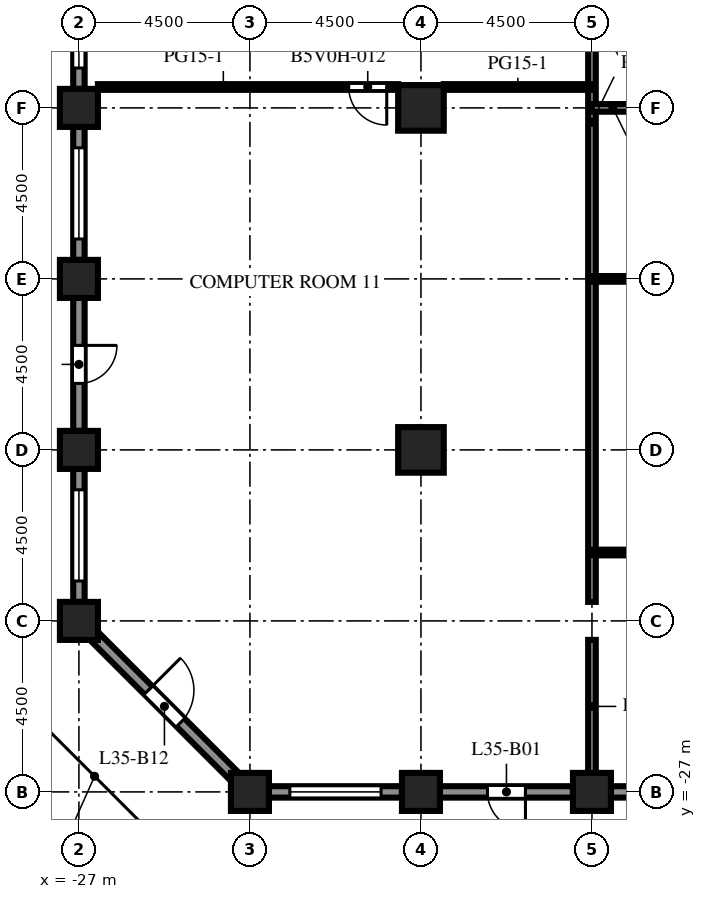
"""IFC4 building model, lengths in metres.
Left out: names, types, materials, properties, quantities, classifications, styles, units other than length and angle.
Written with IfcOpenShell. Run it as: python <this file> out.ifc"""

import sys

from ifc_helpers import new_model, si_unit, direction, frame, frame_2d, origin, origin_2d, place, context, subcontext, project, spatial, rectangle, extrude, element, fill, save


model = new_model("IFC4")
c1 = context("Model", 3, precision=1e-05, world=origin(), true_north=direction((0.0, 1.0)))
c2 = subcontext(c1, "Body", "Model", "MODEL_VIEW")
j1 = project(units=[si_unit("LENGTHUNIT", "METRE"), si_unit("PLANEANGLEUNIT", "RADIAN")], contexts=[c1])
p1 = place(None, origin())
s1 = spatial("IfcSite", under=j1, at=p1, CompositionType="ELEMENT")
p2 = place(p1, origin())
s2 = spatial("IfcBuilding", under=s1, at=p2, CompositionType="ELEMENT")
p3 = place(p2, frame((0.0, 0.0, 156.8)))
s3 = spatial("IfcBuildingStorey", under=s2, at=p3, CompositionType="ELEMENT", Elevation=156.8)
for number, where, z_axis, x_axis in (
    (1, (-27.0, -22.5, 0.0), (0.0, 0.0, 1.0), (1.0, 0.0, 0.0)),
    (2, (-27.0, -18.0, 0.0), (0.0, 0.0, 1.0), (1.0, 0.0, 0.0)),
    (3, (-27.0, -13.5, 0.0), (0.0, 0.0, 1.0), (1.0, 0.0, 0.0)),
    (4, (-27.0, -9.0, 0.0), (0.0, 0.0, 1.0), (1.0, 0.0, 0.0)),
):
    element("IfcColumn", number, at=place(p3, frame(where, z_axis=z_axis, x_axis=x_axis)), inside=s3, PredefinedType="COLUMN", context=c2, shape_type="SweptSolid", body=[
        extrude(rectangle(XDim=1.0, YDim=1.0, at=origin_2d()), origin(), (0.0, 0.0, 1.0), 4.1),
    ])
for number, where, z_axis, x_axis in (
    (5, (-22.5, -27.0, -0.45), (0.0, 0.0, 1.0), (1.0, 0.0, 0.0)),
    (6, (-18.0, -27.0, -0.45), (0.0, 0.0, 1.0), (1.0, 0.0, 0.0)),
    (7, (-13.5, -27.0, -0.45), (0.0, 0.0, 1.0), (1.0, 0.0, 0.0)),
):
    element("IfcColumn", number, at=place(p3, frame(where, z_axis=z_axis, x_axis=x_axis)), inside=s3, PredefinedType="COLUMN", context=c2, shape_type="SweptSolid", body=[
        extrude(rectangle(XDim=1.0, YDim=1.0, at=origin_2d()), origin(), (0.0, 0.0, 1.0), 4.55),
    ])
for number, where, z_axis, x_axis in (
    (8, (-18.0, -18.0, -0.45), (0.0, 0.0, 1.0), (1.0, 0.0, 0.0)),
    (9, (-18.0, -9.0, -0.45), (0.0, 0.0, 1.0), (1.0, 0.0, 0.0)),
):
    element("IfcColumn", number, at=place(p3, frame(where, z_axis=z_axis, x_axis=x_axis)), inside=s3, PredefinedType="COLUMN", context=c2, shape_type="SweptSolid", body=[
        extrude(rectangle(XDim=1.2, YDim=1.2, at=origin_2d()), origin(), (0.0, 0.0, 1.0), 4.55),
    ])
p4 = place(p3, frame((-18.5, -27.0, 0.0), z_axis=(0.0, 0.0, 1.0), x_axis=(-1.0, 0.0, 0.0)))
e10 = element("IfcWall", 10, at=p4, inside=s3, PredefinedType="SOLIDWALL", context=c2, shape_type="SweptSolid", body=[
    extrude(rectangle(XDim=3.5, YDim=0.3, at=frame_2d((1.75, 0.0))), origin(), (0.0, 0.0, 1.0), 2.85),
])
p5 = place(p4, frame((0.55, 0.0, 0.8)))
e11 = element("IfcOpeningElement", 11, at=p5, cuts=e10, PredefinedType="OPENING", context=c2, shape_type="SweptSolid", body=[
    extrude(rectangle(XDim=2.4, YDim=1.7, at=frame_2d((1.2, 0.85))), frame((0.0, 0.16, 0.0), z_axis=(0.0, -1.0, 0.0), x_axis=(1.0, 0.0, 0.0)), (0.0, 0.0, 1.0), 0.32),
])
p6 = place(p3, frame((-14.0, -27.0, 0.0), z_axis=(0.0, 0.0, 1.0), x_axis=(-1.0, 0.0, 0.0)))
e12 = element("IfcWall", 12, at=p6, inside=s3, PredefinedType="SOLIDWALL", context=c2, shape_type="SweptSolid", body=[
    extrude(rectangle(XDim=3.5, YDim=0.3, at=frame_2d((1.75, 0.0))), origin(), (0.0, 0.0, 1.0), 2.85),
])
p7 = place(p6, frame((1.25, 0.0, 0.0)))
e13 = element("IfcOpeningElement", 13, at=p7, cuts=e12, PredefinedType="OPENING", context=c2, shape_type="SweptSolid", body=[
    extrude(rectangle(XDim=1.0, YDim=2.2, at=frame_2d((0.5, 1.1))), frame((0.0, 0.16, 0.0), z_axis=(0.0, -1.0, 0.0), x_axis=(1.0, 0.0, 0.0)), (0.0, 0.0, 1.0), 0.32),
])
p8 = place(p3, frame((-9.5, -27.0, 0.0), z_axis=(0.0, 0.0, 1.0), x_axis=(-1.0, 0.0, 0.0)))
e14 = element("IfcWall", 14, at=p8, inside=s3, PredefinedType="SOLIDWALL", context=c2, shape_type="SweptSolid", body=[
    extrude(rectangle(XDim=3.5, YDim=0.3, at=frame_2d((1.75, 0.0))), origin(), (0.0, 0.0, 1.0), 2.85),
])
p9 = place(p8, frame((0.55, 0.0, 0.8)))
e15 = element("IfcOpeningElement", 15, at=p9, cuts=e14, PredefinedType="OPENING", context=c2, shape_type="SweptSolid", body=[
    extrude(rectangle(XDim=2.4, YDim=1.7, at=frame_2d((1.2, 0.85))), frame((0.0, 0.16, 0.0), z_axis=(0.0, -1.0, 0.0), x_axis=(1.0, 0.0, 0.0)), (0.0, 0.0, 1.0), 0.32),
])
p10 = place(p3, frame((-27.0, -8.5, 0.0), z_axis=(0.0, 0.0, 1.0), x_axis=(0.0, 1.0, 0.0)))
e16 = element("IfcWall", 16, at=p10, inside=s3, PredefinedType="SOLIDWALL", context=c2, shape_type="SweptSolid", body=[
    extrude(rectangle(XDim=3.5, YDim=0.3, at=frame_2d((1.75, 0.0))), origin(), (0.0, 0.0, 1.0), 2.85),
])
p11 = place(p10, frame((0.55, 0.0, 0.8)))
e17 = element("IfcOpeningElement", 17, at=p11, cuts=e16, PredefinedType="OPENING", context=c2, shape_type="SweptSolid", body=[
    extrude(rectangle(XDim=2.4, YDim=1.7, at=frame_2d((1.2, 0.85))), frame((0.0, 0.16, 0.0), z_axis=(0.0, -1.0, 0.0), x_axis=(1.0, 0.0, 0.0)), (0.0, 0.0, 1.0), 0.32),
])
p12 = place(p3, frame((-27.0, -13.0, 0.0), z_axis=(0.0, 0.0, 1.0), x_axis=(0.0, 1.0, 0.0)))
e18 = element("IfcWall", 18, at=p12, inside=s3, PredefinedType="SOLIDWALL", context=c2, shape_type="SweptSolid", body=[
    extrude(rectangle(XDim=3.5, YDim=0.3, at=frame_2d((1.75, 0.0))), origin(), (0.0, 0.0, 1.0), 2.85),
])
p13 = place(p12, frame((0.55, 0.0, 0.8)))
e19 = element("IfcOpeningElement", 19, at=p13, cuts=e18, PredefinedType="OPENING", context=c2, shape_type="SweptSolid", body=[
    extrude(rectangle(XDim=2.4, YDim=1.7, at=frame_2d((1.2, 0.85))), frame((0.0, 0.16, 0.0), z_axis=(0.0, -1.0, 0.0), x_axis=(1.0, 0.0, 0.0)), (0.0, 0.0, 1.0), 0.32),
])
p14 = place(p3, frame((-27.0, -17.5, 0.0), z_axis=(0.0, 0.0, 1.0), x_axis=(0.0, 1.0, 0.0)))
e20 = element("IfcWall", 20, at=p14, inside=s3, PredefinedType="SOLIDWALL", context=c2, shape_type="SweptSolid", body=[
    extrude(rectangle(XDim=3.5, YDim=0.3, at=frame_2d((1.75, 0.0))), origin(), (0.0, 0.0, 1.0), 2.85),
])
p15 = place(p14, frame((1.25, 0.0, 0.0)))
e21 = element("IfcOpeningElement", 21, at=p15, cuts=e20, PredefinedType="OPENING", context=c2, shape_type="SweptSolid", body=[
    extrude(rectangle(XDim=1.0, YDim=2.2, at=frame_2d((0.5, 1.1))), frame((0.0, 0.16, 0.0), z_axis=(0.0, -1.0, 0.0), x_axis=(1.0, 0.0, 0.0)), (0.0, 0.0, 1.0), 0.32),
])
p16 = place(p3, frame((-27.0, -22.0, 0.0), z_axis=(0.0, 0.0, 1.0), x_axis=(0.0, 1.0, 0.0)))
e22 = element("IfcWall", 22, at=p16, inside=s3, PredefinedType="SOLIDWALL", context=c2, shape_type="SweptSolid", body=[
    extrude(rectangle(XDim=3.5, YDim=0.3, at=frame_2d((1.75, 0.0))), origin(), (0.0, 0.0, 1.0), 2.85),
])
p17 = place(p16, frame((0.55, 0.0, 0.8)))
e23 = element("IfcOpeningElement", 23, at=p17, cuts=e22, PredefinedType="OPENING", context=c2, shape_type="SweptSolid", body=[
    extrude(rectangle(XDim=2.4, YDim=1.7, at=frame_2d((1.2, 0.85))), frame((0.0, 0.16, 0.0), z_axis=(0.0, -1.0, 0.0), x_axis=(1.0, 0.0, 0.0)), (0.0, 0.0, 1.0), 0.32),
])
p18 = place(p3, frame((-22.894, -26.606, 0.0), z_axis=(0.0, 0.0, 1.0), x_axis=(-0.707106781187, 0.707106781187, 0.0)))
e24 = element("IfcWall", 24, at=p18, inside=s3, PredefinedType="SOLIDWALL", context=c2, shape_type="SweptSolid", body=[
    extrude(rectangle(XDim=5.25, YDim=0.3, at=frame_2d((2.625, 0.0))), origin(), (0.0, 0.0, 1.0), 2.85),
])
p19 = place(p18, frame((2.025, 0.0, 0.0)))
e25 = element("IfcOpeningElement", 25, at=p19, cuts=e24, PredefinedType="OPENING", context=c2, shape_type="SweptSolid", body=[
    extrude(rectangle(XDim=1.2, YDim=2.2, at=frame_2d((0.6, 1.1))), frame((0.0, 0.16, 0.0), z_axis=(0.0, -1.0, 0.0), x_axis=(1.0, 0.0, 0.0)), (0.0, 0.0, 1.0), 0.32),
])
p20 = place(p3, frame((-13.5, -26.5, 0.0), z_axis=(0.0, 0.0, 1.0), x_axis=(0.0, 1.0, 0.0)))
e26 = element("IfcWall", 26, at=p20, inside=s3, PredefinedType="PARTITIONING", context=c2, shape_type="SweptSolid", body=[
    extrude(rectangle(XDim=3.5, YDim=0.2, at=frame_2d((1.75, 0.0))), origin(), (0.0, 0.0, 1.0), 3.65),
])
p21 = place(p3, frame((-13.5, -22.0, 0.0), z_axis=(0.0, 0.0, 1.0), x_axis=(0.0, 1.0, 0.0)))
e27 = element("IfcWall", 27, at=p21, inside=s3, PredefinedType="PARTITIONING", context=c2, shape_type="SweptSolid", body=[
    extrude(rectangle(XDim=25.25, YDim=0.2, at=frame_2d((12.625, 0.0))), origin(), (0.0, 0.0, 1.0), 3.65),
])
p22 = place(p3, frame((21.0, -20.7, 0.0), z_axis=(0.0, 0.0, 1.0), x_axis=(-1.0, 0.0, 0.0)))
e28 = element("IfcWall", 28, at=p22, inside=s3, PredefinedType="PARTITIONING", context=c2, shape_type="SweptSolid", body=[
    extrude(rectangle(XDim=34.5, YDim=0.15, at=frame_2d((17.25, 0.0))), origin(), (0.0, 0.0, 1.0), 3.65),
])
p23 = place(p22, frame((26.9, 0.0, 0.0)))
e29 = element("IfcOpeningElement", 29, at=p23, cuts=e28, PredefinedType="OPENING", context=c2, shape_type="SweptSolid", body=[
    extrude(rectangle(XDim=1.0, YDim=2.1, at=frame_2d((0.5, 1.05))), frame((0.0, 0.085, 0.0), z_axis=(0.0, -1.0, 0.0), x_axis=(1.0, 0.0, 0.0)), (0.0, 0.0, 1.0), 0.17),
])
p24 = place(p22, frame((18.25, 0.0, 0.0)))
e30 = element("IfcOpeningElement", 30, at=p24, cuts=e28, PredefinedType="OPENING", context=c2, shape_type="SweptSolid", body=[
    extrude(rectangle(XDim=1.0, YDim=2.1, at=frame_2d((0.5, 1.05))), frame((0.0, 0.085, 0.0), z_axis=(0.0, -1.0, 0.0), x_axis=(1.0, 0.0, 0.0)), (0.0, 0.0, 1.0), 0.17),
])
p25 = place(p22, frame((12.65, 0.0, 0.0)))
e31 = element("IfcOpeningElement", 31, at=p25, cuts=e28, PredefinedType="OPENING", context=c2, shape_type="SweptSolid", body=[
    extrude(rectangle(XDim=1.0, YDim=2.1, at=frame_2d((0.5, 1.05))), frame((0.0, 0.085, 0.0), z_axis=(0.0, -1.0, 0.0), x_axis=(1.0, 0.0, 0.0)), (0.0, 0.0, 1.0), 0.17),
])
p26 = place(p22, frame((1.4, 0.0, 0.0)))
e32 = element("IfcOpeningElement", 32, at=p26, cuts=e28, PredefinedType="OPENING", context=c2, shape_type="SweptSolid", body=[
    extrude(rectangle(XDim=1.0, YDim=2.1, at=frame_2d((0.5, 1.05))), frame((0.0, 0.085, 0.0), z_axis=(0.0, -1.0, 0.0), x_axis=(1.0, 0.0, 0.0)), (0.0, 0.0, 1.0), 0.17),
])
p27 = place(p3, frame((21.0, -13.5, 0.0), z_axis=(0.0, 0.0, 1.0), x_axis=(-1.0, 0.0, 0.0)))
e33 = element("IfcWall", 33, at=p27, inside=s3, PredefinedType="PARTITIONING", context=c2, shape_type="SweptSolid", body=[
    extrude(rectangle(XDim=34.5, YDim=0.15, at=frame_2d((17.25, 0.0))), origin(), (0.0, 0.0, 1.0), 3.65),
])
p28 = place(p27, frame((27.4, 0.0, 0.0)))
e34 = element("IfcOpeningElement", 34, at=p28, cuts=e33, PredefinedType="OPENING", context=c2, shape_type="SweptSolid", body=[
    extrude(rectangle(XDim=1.0, YDim=2.1, at=frame_2d((0.5, 1.05))), frame((0.0, 0.085, 0.0), z_axis=(0.0, -1.0, 0.0), x_axis=(1.0, 0.0, 0.0)), (0.0, 0.0, 1.0), 0.17),
])
p29 = place(p27, frame((17.5, 0.0, 0.0)))
e35 = element("IfcOpeningElement", 35, at=p29, cuts=e33, PredefinedType="OPENING", context=c2, shape_type="SweptSolid", body=[
    extrude(rectangle(XDim=1.0, YDim=2.1, at=frame_2d((0.5, 1.05))), frame((0.0, 0.085, 0.0), z_axis=(0.0, -1.0, 0.0), x_axis=(1.0, 0.0, 0.0)), (0.0, 0.0, 1.0), 0.17),
])
p30 = place(p27, frame((10.4, 0.0, 0.0)))
e36 = element("IfcOpeningElement", 36, at=p30, cuts=e33, PredefinedType="OPENING", context=c2, shape_type="SweptSolid", body=[
    extrude(rectangle(XDim=1.0, YDim=2.1, at=frame_2d((0.5, 1.05))), frame((0.0, 0.085, 0.0), z_axis=(0.0, -1.0, 0.0), x_axis=(1.0, 0.0, 0.0)), (0.0, 0.0, 1.0), 0.17),
])
p31 = place(p27, frame((3.65, 0.0, 0.0)))
e37 = element("IfcOpeningElement", 37, at=p31, cuts=e33, PredefinedType="OPENING", context=c2, shape_type="SweptSolid", body=[
    extrude(rectangle(XDim=1.0, YDim=2.1, at=frame_2d((0.5, 1.05))), frame((0.0, 0.085, 0.0), z_axis=(0.0, -1.0, 0.0), x_axis=(1.0, 0.0, 0.0)), (0.0, 0.0, 1.0), 0.17),
])
p32 = place(p3, frame((-10.5, -9.0, 0.0), z_axis=(0.0, 0.0, 1.0), x_axis=(-1.0, 0.0, 0.0)))
e38 = element("IfcWall", 38, at=p32, inside=s3, PredefinedType="PARTITIONING", context=c2, shape_type="SweptSolid", body=[
    extrude(rectangle(XDim=3.0, YDim=0.2, at=frame_2d((1.5, 0.0))), origin(), (0.0, 0.0, 1.0), 3.65),
])
p33 = place(p32, frame((0.9, 0.0, 0.0)))
e39 = element("IfcOpeningElement", 39, at=p33, cuts=e38, PredefinedType="OPENING", context=c2, shape_type="SweptSolid", body=[
    extrude(rectangle(XDim=1.0, YDim=2.1, at=frame_2d((0.5, 1.05))), frame((0.0, 0.11, 0.0), z_axis=(0.0, -1.0, 0.0), x_axis=(1.0, 0.0, 0.0)), (0.0, 0.0, 1.0), 0.22),
])
p34 = place(p3, frame((-18.6, -8.45, 0.0), z_axis=(0.0, 0.0, 1.0), x_axis=(-1.0, 0.0, 0.0)))
e40 = element("IfcWall", 40, at=p34, inside=s3, PredefinedType="PARTITIONING", context=c2, shape_type="SweptSolid", body=[
    extrude(rectangle(XDim=7.9, YDim=0.15, at=frame_2d((3.95, 0.0))), origin(), (0.0, 0.0, 1.0), 3.65),
])
p35 = place(p34, frame((0.3, 0.0, 0.0)))
e41 = element("IfcOpeningElement", 41, at=p35, cuts=e40, PredefinedType="OPENING", context=c2, shape_type="SweptSolid", body=[
    extrude(rectangle(XDim=1.0, YDim=2.1, at=frame_2d((0.5, 1.05))), frame((0.0, 0.085, 0.0), z_axis=(0.0, -1.0, 0.0), x_axis=(1.0, 0.0, 0.0)), (0.0, 0.0, 1.0), 0.17),
])
p36 = place(p3, frame((-17.4, -8.45, 0.0), z_axis=(0.0, 0.0, 1.0), x_axis=(1.0, 0.0, 0.0)))
e42 = element("IfcWall", 42, at=p36, inside=s3, PredefinedType="PARTITIONING", context=c2, shape_type="SweptSolid", body=[
    extrude(rectangle(XDim=3.9, YDim=0.15, at=frame_2d((1.95, 0.0))), origin(), (0.0, 0.0, 1.0), 3.65),
])
p37 = place(p5, origin())
e43 = element("IfcWindow", 43, at=p37, inside=s3, PartitioningType="SINGLE_PANEL", PredefinedType="WINDOW", context=c2, shape_type="SweptSolid", body=[
    extrude(rectangle(XDim=2.4, YDim=1.7, at=frame_2d((1.2, 0.85))), frame((0.0, 0.03, 0.0), z_axis=(0.0, -1.0, 0.0), x_axis=(1.0, 0.0, 0.0)), (0.0, 0.0, 1.0), 0.06),
])
fill(e11, e43)
p38 = place(p7, origin())
e44 = element("IfcDoor", 44, at=p38, inside=s3, OperationType="SINGLE_SWING_LEFT", PredefinedType="DOOR", context=c2, shape_type="SweptSolid", body=[
    extrude(rectangle(XDim=1.0, YDim=2.2, at=frame_2d((0.5, 1.1))), frame((0.0, 0.025, 0.0), z_axis=(0.0, -1.0, 0.0), x_axis=(1.0, 0.0, 0.0)), (0.0, 0.0, 1.0), 0.05),
])
fill(e13, e44)
p39 = place(p11, origin())
e45 = element("IfcWindow", 45, at=p39, inside=s3, PartitioningType="SINGLE_PANEL", PredefinedType="WINDOW", context=c2, shape_type="SweptSolid", body=[
    extrude(rectangle(XDim=2.4, YDim=1.7, at=frame_2d((1.2, 0.85))), frame((0.0, 0.03, 0.0), z_axis=(0.0, -1.0, 0.0), x_axis=(1.0, 0.0, 0.0)), (0.0, 0.0, 1.0), 0.06),
])
fill(e17, e45)
p40 = place(p13, origin())
e46 = element("IfcWindow", 46, at=p40, inside=s3, PartitioningType="SINGLE_PANEL", PredefinedType="WINDOW", context=c2, shape_type="SweptSolid", body=[
    extrude(rectangle(XDim=2.4, YDim=1.7, at=frame_2d((1.2, 0.85))), frame((0.0, 0.03, 0.0), z_axis=(0.0, -1.0, 0.0), x_axis=(1.0, 0.0, 0.0)), (0.0, 0.0, 1.0), 0.06),
])
fill(e19, e46)
p41 = place(p15, origin())
e47 = element("IfcDoor", 47, at=p41, inside=s3, OperationType="SINGLE_SWING_RIGHT", PredefinedType="DOOR", context=c2, shape_type="SweptSolid", body=[
    extrude(rectangle(XDim=1.0, YDim=2.2, at=frame_2d((0.5, 1.1))), frame((0.0, 0.025, 0.0), z_axis=(0.0, -1.0, 0.0), x_axis=(1.0, 0.0, 0.0)), (0.0, 0.0, 1.0), 0.05),
])
fill(e21, e47)
p42 = place(p17, origin())
e48 = element("IfcWindow", 48, at=p42, inside=s3, PartitioningType="SINGLE_PANEL", PredefinedType="WINDOW", context=c2, shape_type="SweptSolid", body=[
    extrude(rectangle(XDim=2.4, YDim=1.7, at=frame_2d((1.2, 0.85))), frame((0.0, 0.03, 0.0), z_axis=(0.0, -1.0, 0.0), x_axis=(1.0, 0.0, 0.0)), (0.0, 0.0, 1.0), 0.06),
])
fill(e23, e48)
p43 = place(p19, origin())
e49 = element("IfcDoor", 49, at=p43, inside=s3, OperationType="SINGLE_SWING_RIGHT", PredefinedType="DOOR", context=c2, shape_type="SweptSolid", body=[
    extrude(rectangle(XDim=1.2, YDim=2.2, at=frame_2d((0.6, 1.1))), frame((0.0, 0.025, 0.0), z_axis=(0.0, -1.0, 0.0), x_axis=(1.0, 0.0, 0.0)), (0.0, 0.0, 1.0), 0.05),
])
fill(e25, e49)
p44 = place(p35, origin())
e50 = element("IfcDoor", 50, at=p44, inside=s3, OperationType="SINGLE_SWING_LEFT", PredefinedType="DOOR", context=c2, shape_type="SweptSolid", body=[
    extrude(rectangle(XDim=1.0, YDim=2.1, at=frame_2d((0.5, 1.05))), frame((0.0, 0.025, 0.0), z_axis=(0.0, -1.0, 0.0), x_axis=(1.0, 0.0, 0.0)), (0.0, 0.0, 1.0), 0.05),
])
fill(e41, e50)
save(model, sys.argv[1])
